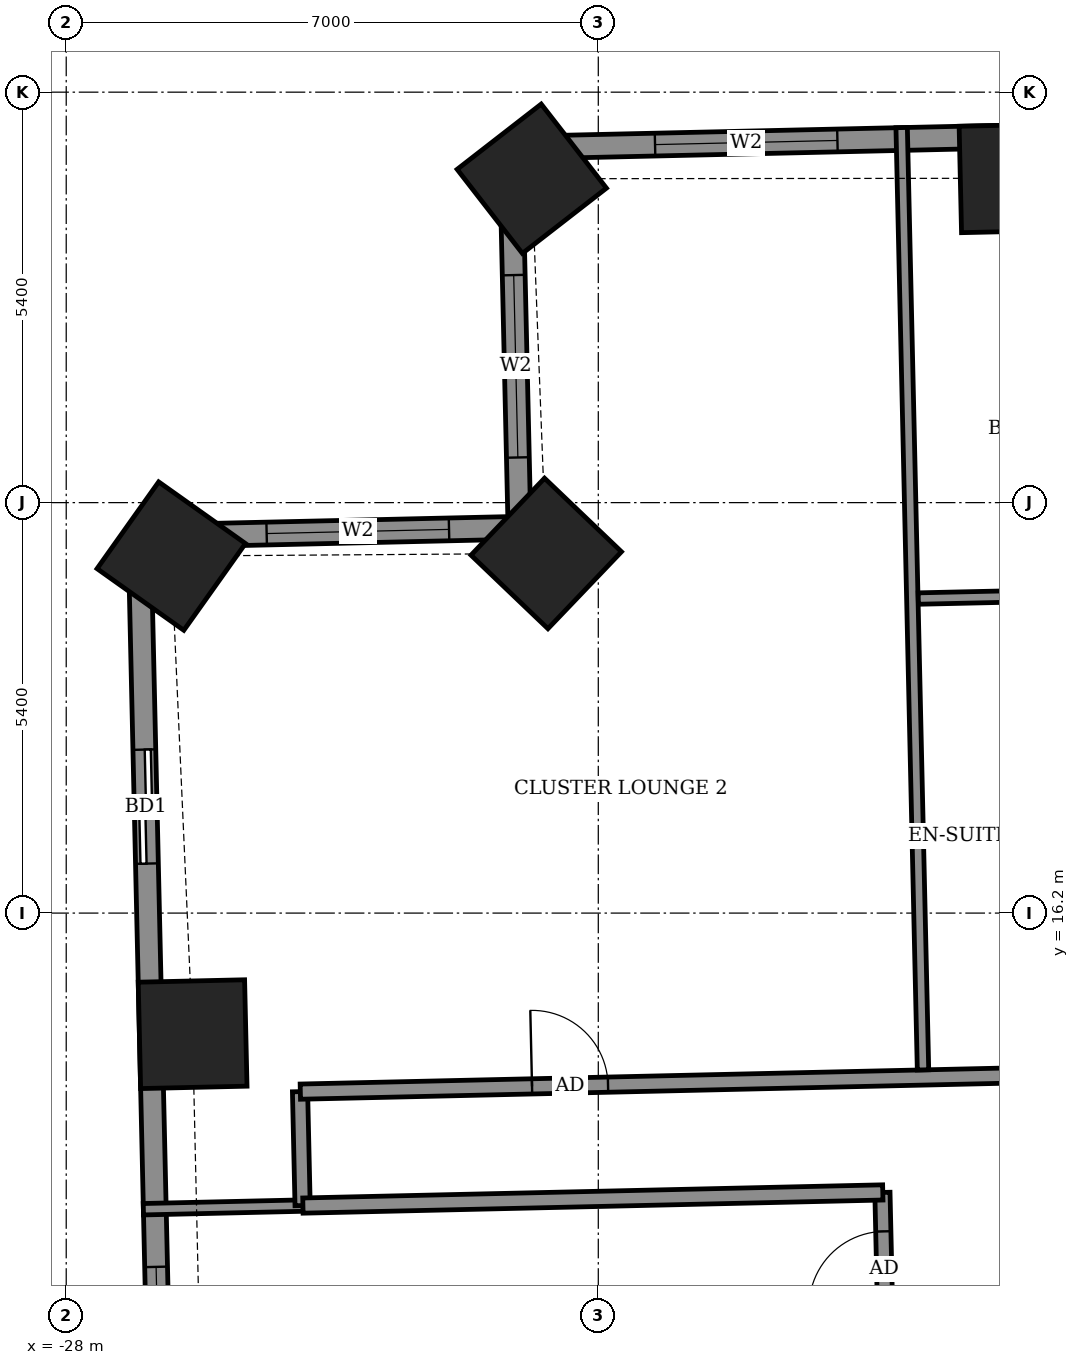
"""IFC4 building model, lengths in metres.
Left out: names, types, materials, properties, quantities, classifications, styles, units other than length and angle.
Written with IfcOpenShell. Run it as: python <this file> out.ifc"""

import sys

from ifc_helpers import new_model, si_unit, direction, frame, frame_2d, origin, origin_2d, place, context, subcontext, project, spatial, rectangle, extrude, element, fill, save


model = new_model("IFC4")
c1 = context("Model", 3, precision=1e-05, world=origin(), true_north=direction((0.0, 1.0)))
c2 = subcontext(c1, "Body", "Model", "MODEL_VIEW")
j1 = project(units=[si_unit("LENGTHUNIT", "METRE"), si_unit("PLANEANGLEUNIT", "RADIAN")], contexts=[c1])
p1 = place(None, origin())
s1 = spatial("IfcSite", under=j1, at=p1, CompositionType="ELEMENT")
p2 = place(p1, origin())
s2 = spatial("IfcBuilding", under=s1, at=p2, CompositionType="ELEMENT")
p3 = place(p2, frame((0.0, 0.0, 90.1)))
s3 = spatial("IfcBuildingStorey", under=s2, at=p3, CompositionType="ELEMENT", Elevation=90.1)
for number, where, z_axis, x_axis in (
    (1, (-15.537, 25.867, -0.55), (0.0, 0.0, 1.0), (-1.0, -0.023, 0.0)),
    (2, (-21.875, 25.861, -0.55), (0.0, 0.0, 1.0), (-0.79, -0.613, 0.0)),
    (3, (-21.685, 20.931, -0.55), (0.0, 0.0, 1.0), (-0.691, -0.723, 0.0)),
    (4, (-26.618, 20.897, -0.55), (0.0, 0.0, 1.0), (-0.579, -0.815, 0.0)),
    (5, (-26.337, 14.607, -0.55), (0.0, 0.0, 1.0), (0.023, -1.0, 0.0)),
):
    element("IfcColumn", number, at=place(p3, frame(where, z_axis=z_axis, x_axis=x_axis)), inside=s3, PredefinedType="COLUMN", context=c2, shape_type="SweptSolid", body=[
        extrude(rectangle(XDim=1.4, YDim=1.4, at=origin_2d()), origin(), (0.0, 0.0, 1.0), 3.6),
    ])
p4 = place(p3, frame((24.809, 27.333, 0.0), z_axis=(0.0, 0.0, 1.0), x_axis=(-0.999742489858, -0.022692597327, 0.0)))
e6 = element("IfcWall", 6, at=p4, inside=s3, PredefinedType="SOLIDWALL", context=c2, shape_type="SweptSolid", body=[
    extrude(rectangle(XDim=46.972, YDim=0.3, at=frame_2d((23.486, 0.0))), origin(), (0.0, 0.0, 1.0), 3.05),
])
p5 = place(p4, frame((1.311, 0.0, 0.0)))
e7 = element("IfcOpeningElement", 7, at=p5, cuts=e6, PredefinedType="OPENING", context=c2, shape_type="SweptSolid", body=[
    extrude(rectangle(XDim=1.2, YDim=2.4, at=frame_2d((0.6, 1.2))), frame((0.0, 0.16, 0.0), z_axis=(0.0, -1.0, 0.0), x_axis=(1.0, 0.0, 0.0)), (0.0, 0.0, 1.0), 0.32),
])
p6 = place(p4, frame((3.763, 0.0, 0.0)))
e8 = element("IfcOpeningElement", 8, at=p6, cuts=e6, PredefinedType="OPENING", context=c2, shape_type="SweptSolid", body=[
    extrude(rectangle(XDim=1.5, YDim=2.4, at=frame_2d((0.75, 1.2))), frame((0.0, 0.16, 0.0), z_axis=(0.0, -1.0, 0.0), x_axis=(1.0, 0.0, 0.0)), (0.0, 0.0, 1.0), 0.32),
])
p7 = place(p4, frame((8.647, 0.0, 0.0)))
e9 = element("IfcOpeningElement", 9, at=p7, cuts=e6, PredefinedType="OPENING", context=c2, shape_type="SweptSolid", body=[
    extrude(rectangle(XDim=1.5, YDim=2.4, at=frame_2d((0.75, 1.2))), frame((0.0, 0.16, 0.0), z_axis=(0.0, -1.0, 0.0), x_axis=(1.0, 0.0, 0.0)), (0.0, 0.0, 1.0), 0.32),
])
p8 = place(p4, frame((14.239, 0.0, 0.0)))
e10 = element("IfcOpeningElement", 10, at=p8, cuts=e6, PredefinedType="OPENING", context=c2, shape_type="SweptSolid", body=[
    extrude(rectangle(XDim=1.2, YDim=2.4, at=frame_2d((0.6, 1.2))), frame((0.0, 0.16, 0.0), z_axis=(0.0, -1.0, 0.0), x_axis=(1.0, 0.0, 0.0)), (0.0, 0.0, 1.0), 0.32),
])
p9 = place(p4, frame((17.016, 0.0, 0.0)))
e11 = element("IfcOpeningElement", 11, at=p9, cuts=e6, PredefinedType="OPENING", context=c2, shape_type="SweptSolid", body=[
    extrude(rectangle(XDim=1.5, YDim=2.4, at=frame_2d((0.75, 1.2))), frame((0.0, 0.16, 0.0), z_axis=(0.0, -1.0, 0.0), x_axis=(1.0, 0.0, 0.0)), (0.0, 0.0, 1.0), 0.32),
])
p10 = place(p4, frame((21.816, 0.0, 0.0)))
e12 = element("IfcOpeningElement", 12, at=p10, cuts=e6, PredefinedType="OPENING", context=c2, shape_type="SweptSolid", body=[
    extrude(rectangle(XDim=1.5, YDim=2.4, at=frame_2d((0.75, 1.2))), frame((0.0, 0.16, 0.0), z_axis=(0.0, -1.0, 0.0), x_axis=(1.0, 0.0, 0.0)), (0.0, 0.0, 1.0), 0.32),
])
p11 = place(p4, frame((24.817, 0.0, 0.0)))
e13 = element("IfcOpeningElement", 13, at=p11, cuts=e6, PredefinedType="OPENING", context=c2, shape_type="SweptSolid", body=[
    extrude(rectangle(XDim=1.2, YDim=2.4, at=frame_2d((0.6, 1.2))), frame((0.0, 0.16, 0.0), z_axis=(0.0, -1.0, 0.0), x_axis=(1.0, 0.0, 0.0)), (0.0, 0.0, 1.0), 0.32),
])
p12 = place(p4, frame((30.244, 0.0, 0.0)))
e14 = element("IfcOpeningElement", 14, at=p12, cuts=e6, PredefinedType="OPENING", context=c2, shape_type="SweptSolid", body=[
    extrude(rectangle(XDim=1.5, YDim=2.4, at=frame_2d((0.75, 1.2))), frame((0.0, 0.16, 0.0), z_axis=(0.0, -1.0, 0.0), x_axis=(1.0, 0.0, 0.0)), (0.0, 0.0, 1.0), 0.32),
])
p13 = place(p4, frame((35.069, 0.0, 0.0)))
e15 = element("IfcOpeningElement", 15, at=p13, cuts=e6, PredefinedType="OPENING", context=c2, shape_type="SweptSolid", body=[
    extrude(rectangle(XDim=1.5, YDim=2.4, at=frame_2d((0.75, 1.2))), frame((0.0, 0.16, 0.0), z_axis=(0.0, -1.0, 0.0), x_axis=(1.0, 0.0, 0.0)), (0.0, 0.0, 1.0), 0.32),
])
p14 = place(p4, frame((37.995, 0.0, 0.0)))
e16 = element("IfcOpeningElement", 16, at=p14, cuts=e6, PredefinedType="OPENING", context=c2, shape_type="SweptSolid", body=[
    extrude(rectangle(XDim=1.5, YDim=2.4, at=frame_2d((0.75, 1.2))), frame((0.0, 0.16, 0.0), z_axis=(0.0, -1.0, 0.0), x_axis=(1.0, 0.0, 0.0)), (0.0, 0.0, 1.0), 0.32),
])
p15 = place(p4, frame((42.674, 0.0, 0.9)))
e17 = element("IfcOpeningElement", 17, at=p15, cuts=e6, PredefinedType="OPENING", context=c2, shape_type="SweptSolid", body=[
    extrude(rectangle(XDim=2.4, YDim=1.5, at=frame_2d((1.2, 0.75))), frame((0.0, 0.16, 0.0), z_axis=(0.0, -1.0, 0.0), x_axis=(1.0, 0.0, 0.0)), (0.0, 0.0, 1.0), 0.32),
])
p16 = place(p3, frame((-22.151, 26.267, 0.0), z_axis=(0.0, 0.0, 1.0), x_axis=(0.022756903044, -0.999741028149, 0.0)))
e18 = element("IfcWall", 18, at=p16, inside=s3, PredefinedType="SOLIDWALL", context=c2, shape_type="SweptSolid", body=[
    extrude(rectangle(XDim=4.999, YDim=0.3, at=frame_2d((2.5, 0.0))), origin(), (0.0, 0.0, 1.0), 2.55),
])
p17 = place(p16, frame((1.674, 0.0, 0.9)))
e19 = element("IfcOpeningElement", 19, at=p17, cuts=e18, PredefinedType="OPENING", context=c2, shape_type="SweptSolid", body=[
    extrude(rectangle(XDim=2.4, YDim=1.5, at=frame_2d((1.2, 0.75))), frame((0.0, 0.16, 0.0), z_axis=(0.0, -1.0, 0.0), x_axis=(1.0, 0.0, 0.0)), (0.0, 0.0, 1.0), 0.32),
])
p18 = place(p3, frame((-22.037, 21.269, 0.0), z_axis=(0.0, 0.0, 1.0), x_axis=(-0.999739992103, -0.022802372469, 0.0)))
e20 = element("IfcWall", 20, at=p18, inside=s3, PredefinedType="SOLIDWALL", context=c2, shape_type="SweptSolid", body=[
    extrude(rectangle(XDim=5.0, YDim=0.3, at=frame_2d((2.5, 0.0))), origin(), (0.0, 0.0, 1.0), 2.55),
])
p19 = place(p18, frame((0.927, 0.0, 0.9)))
e21 = element("IfcOpeningElement", 21, at=p19, cuts=e20, PredefinedType="OPENING", context=c2, shape_type="SweptSolid", body=[
    extrude(rectangle(XDim=2.4, YDim=1.5, at=frame_2d((1.2, 0.75))), frame((0.0, 0.16, 0.0), z_axis=(0.0, -1.0, 0.0), x_axis=(1.0, 0.0, 0.0)), (0.0, 0.0, 1.0), 0.32),
])
p20 = place(p3, frame((-27.036, 21.155, 0.0), z_axis=(0.0, 0.0, 1.0), x_axis=(0.022730142562, -0.999741636934, 0.0)))
e22 = element("IfcWall", 22, at=p20, inside=s3, PredefinedType="SOLIDWALL", context=c2, shape_type="SweptSolid", body=[
    extrude(rectangle(XDim=13.329, YDim=0.3, at=frame_2d((6.665, 0.0))), origin(), (0.0, 0.0, 1.0), 3.05),
])
p21 = place(p20, frame((2.805, 0.0, 0.0)))
e23 = element("IfcOpeningElement", 23, at=p21, cuts=e22, PredefinedType="OPENING", context=c2, shape_type="SweptSolid", body=[
    extrude(rectangle(XDim=1.5, YDim=2.4, at=frame_2d((0.75, 1.2))), frame((0.0, 0.16, 0.0), z_axis=(0.0, -1.0, 0.0), x_axis=(1.0, 0.0, 0.0)), (0.0, 0.0, 1.0), 0.32),
])
p22 = place(p20, frame((9.612, 0.0, 0.9)))
e24 = element("IfcOpeningElement", 24, at=p22, cuts=e22, PredefinedType="OPENING", context=c2, shape_type="SweptSolid", body=[
    extrude(rectangle(XDim=2.4, YDim=1.5, at=frame_2d((1.2, 0.75))), frame((0.0, 0.16, 0.0), z_axis=(0.0, -1.0, 0.0), x_axis=(1.0, 0.0, 0.0)), (0.0, 0.0, 1.0), 0.32),
])
p23 = place(p3, frame((-16.684, -12.919, 0.0), z_axis=(0.0, 0.0, 1.0), x_axis=(-0.022706151961, 0.999742182097, 0.0)))
e25 = element("IfcWall", 25, at=p23, inside=s3, PredefinedType="PARTITIONING", context=c2, shape_type="SweptSolid", body=[
    extrude(rectangle(XDim=25.45, YDim=0.2, at=frame_2d((12.725, 0.0))), origin(), (0.0, 0.0, 1.0), 3.05),
])
p24 = place(p23, frame((23.938, 0.0, 0.0)))
e26 = element("IfcOpeningElement", 26, at=p24, cuts=e25, PredefinedType="OPENING", context=c2, shape_type="SweptSolid", body=[
    extrude(rectangle(XDim=1.0, YDim=2.1, at=frame_2d((0.5, 1.05))), frame((0.0, 0.11, 0.0), z_axis=(0.0, -1.0, 0.0), x_axis=(1.0, 0.0, 0.0)), (0.0, 0.0, 1.0), 0.22),
])
p25 = place(p23, frame((21.775, 0.0, 0.0)))
e27 = element("IfcOpeningElement", 27, at=p25, cuts=e25, PredefinedType="OPENING", context=c2, shape_type="SweptSolid", body=[
    extrude(rectangle(XDim=0.9, YDim=2.1, at=frame_2d((0.45, 1.05))), frame((0.0, 0.11, 0.0), z_axis=(0.0, -1.0, 0.0), x_axis=(1.0, 0.0, 0.0)), (0.0, 0.0, 1.0), 0.22),
])
p26 = place(p23, frame((16.975, 0.0, 0.0)))
e28 = element("IfcOpeningElement", 28, at=p26, cuts=e25, PredefinedType="OPENING", context=c2, shape_type="SweptSolid", body=[
    extrude(rectangle(XDim=1.0, YDim=2.1, at=frame_2d((0.5, 1.05))), frame((0.0, 0.11, 0.0), z_axis=(0.0, -1.0, 0.0), x_axis=(1.0, 0.0, 0.0)), (0.0, 0.0, 1.0), 0.22),
])
p27 = place(p23, frame((19.275, 0.0, 0.0)))
e29 = element("IfcOpeningElement", 29, at=p27, cuts=e25, PredefinedType="OPENING", context=c2, shape_type="SweptSolid", body=[
    extrude(rectangle(XDim=0.9, YDim=2.1, at=frame_2d((0.45, 1.05))), frame((0.0, 0.11, 0.0), z_axis=(0.0, -1.0, 0.0), x_axis=(1.0, 0.0, 0.0)), (0.0, 0.0, 1.0), 0.22),
])
p28 = place(p23, frame((15.075, 0.0, 0.0)))
e30 = element("IfcOpeningElement", 30, at=p28, cuts=e25, PredefinedType="OPENING", context=c2, shape_type="SweptSolid", body=[
    extrude(rectangle(XDim=1.0, YDim=2.1, at=frame_2d((0.5, 1.05))), frame((0.0, 0.11, 0.0), z_axis=(0.0, -1.0, 0.0), x_axis=(1.0, 0.0, 0.0)), (0.0, 0.0, 1.0), 0.22),
])
p29 = place(p23, frame((12.975, 0.0, 0.0)))
e31 = element("IfcOpeningElement", 31, at=p29, cuts=e25, PredefinedType="OPENING", context=c2, shape_type="SweptSolid", body=[
    extrude(rectangle(XDim=0.9, YDim=2.1, at=frame_2d((0.45, 1.05))), frame((0.0, 0.11, 0.0), z_axis=(0.0, -1.0, 0.0), x_axis=(1.0, 0.0, 0.0)), (0.0, 0.0, 1.0), 0.22),
])
p30 = place(p23, frame((10.55, 0.0, 0.0)))
e32 = element("IfcOpeningElement", 32, at=p30, cuts=e25, PredefinedType="OPENING", context=c2, shape_type="SweptSolid", body=[
    extrude(rectangle(XDim=1.0, YDim=2.1, at=frame_2d((0.5, 1.05))), frame((0.0, 0.11, 0.0), z_axis=(0.0, -1.0, 0.0), x_axis=(1.0, 0.0, 0.0)), (0.0, 0.0, 1.0), 0.22),
])
p31 = place(p23, frame((8.125, 0.0, 0.0)))
e33 = element("IfcOpeningElement", 33, at=p31, cuts=e25, PredefinedType="OPENING", context=c2, shape_type="SweptSolid", body=[
    extrude(rectangle(XDim=0.9, YDim=2.1, at=frame_2d((0.45, 1.05))), frame((0.0, 0.11, 0.0), z_axis=(0.0, -1.0, 0.0), x_axis=(1.0, 0.0, 0.0)), (0.0, 0.0, 1.0), 0.22),
])
p32 = place(p23, frame((1.737, 0.0, 0.0)))
e34 = element("IfcOpeningElement", 34, at=p32, cuts=e25, PredefinedType="OPENING", context=c2, shape_type="SweptSolid", body=[
    extrude(rectangle(XDim=1.0, YDim=2.1, at=frame_2d((0.5, 1.05))), frame((0.0, 0.11, 0.0), z_axis=(0.0, -1.0, 0.0), x_axis=(1.0, 0.0, 0.0)), (0.0, 0.0, 1.0), 0.22),
])
p33 = place(p23, frame((5.425, 0.0, 0.0)))
e35 = element("IfcOpeningElement", 35, at=p33, cuts=e25, PredefinedType="OPENING", context=c2, shape_type="SweptSolid", body=[
    extrude(rectangle(XDim=0.9, YDim=2.1, at=frame_2d((0.45, 1.05))), frame((0.0, 0.11, 0.0), z_axis=(0.0, -1.0, 0.0), x_axis=(1.0, 0.0, 0.0)), (0.0, 0.0, 1.0), 0.22),
])
p34 = place(p3, frame((-26.985, 12.304, 0.0), z_axis=(0.0, 0.0, 1.0), x_axis=(0.999738589876, 0.02286376854, 0.0)))
e36 = element("IfcWall", 36, at=p34, inside=s3, PredefinedType="PARTITIONING", context=c2, shape_type="SweptSolid", body=[
    extrude(rectangle(XDim=2.104, YDim=0.15, at=frame_2d((1.052, 0.0))), origin(), (0.0, 0.0, 1.0), 2.55),
])
p35 = place(p3, frame((-24.89, 12.352, 0.0), z_axis=(0.0, 0.0, 1.0), x_axis=(-0.02279537805, 0.999740151609, 0.0)))
e37 = element("IfcWall", 37, at=p35, inside=s3, PredefinedType="PARTITIONING", context=c2, shape_type="SweptSolid", body=[
    extrude(rectangle(XDim=1.5, YDim=0.2, at=frame_2d((0.75, 0.0))), origin(), (0.0, 0.0, 1.0), 3.05),
])
p36 = place(p3, frame((-24.886, 12.352, 0.0), z_axis=(0.0, 0.0, 1.0), x_axis=(0.999743418763, 0.0226516366, 0.0)))
e38 = element("IfcWall", 38, at=p36, inside=s3, PredefinedType="PARTITIONING", context=c2, shape_type="SweptSolid", body=[
    extrude(rectangle(XDim=7.631, YDim=0.2, at=frame_2d((3.815, 0.0))), origin(), (0.0, 0.0, 1.0), 3.05),
])
p37 = place(p3, frame((-24.92, 13.851, 0.0), z_axis=(0.0, 0.0, 1.0), x_axis=(0.999742411711, 0.022696039895, 0.0)))
e39 = element("IfcWall", 39, at=p37, inside=s3, PredefinedType="PARTITIONING", context=c2, shape_type="SweptSolid", body=[
    extrude(rectangle(XDim=52.472, YDim=0.2, at=frame_2d((26.236, 0.0))), origin(), (0.0, 0.0, 1.0), 3.05),
])
p38 = place(p37, frame((50.088, 0.0, 0.0)))
e40 = element("IfcOpeningElement", 40, at=p38, cuts=e39, PredefinedType="OPENING", context=c2, shape_type="SweptSolid", body=[
    extrude(rectangle(XDim=1.0, YDim=2.1, at=frame_2d((0.5, 1.05))), frame((0.0, 0.11, 0.0), z_axis=(0.0, -1.0, 0.0), x_axis=(1.0, 0.0, 0.0)), (0.0, 0.0, 1.0), 0.22),
])
p39 = place(p37, frame((45.725, 0.0, 0.0)))
e41 = element("IfcOpeningElement", 41, at=p39, cuts=e39, PredefinedType="OPENING", context=c2, shape_type="SweptSolid", body=[
    extrude(rectangle(XDim=0.9, YDim=2.1, at=frame_2d((0.45, 1.05))), frame((0.0, 0.11, 0.0), z_axis=(0.0, -1.0, 0.0), x_axis=(1.0, 0.0, 0.0)), (0.0, 0.0, 1.0), 0.22),
])
p40 = place(p37, frame((38.975, 0.0, 0.0)))
e42 = element("IfcOpeningElement", 42, at=p40, cuts=e39, PredefinedType="OPENING", context=c2, shape_type="SweptSolid", body=[
    extrude(rectangle(XDim=0.9, YDim=2.1, at=frame_2d((0.45, 1.05))), frame((0.0, 0.11, 0.0), z_axis=(0.0, -1.0, 0.0), x_axis=(1.0, 0.0, 0.0)), (0.0, 0.0, 1.0), 0.22),
])
p41 = place(p37, frame((37.05, 0.0, 0.0)))
e43 = element("IfcOpeningElement", 43, at=p41, cuts=e39, PredefinedType="OPENING", context=c2, shape_type="SweptSolid", body=[
    extrude(rectangle(XDim=0.9, YDim=2.1, at=frame_2d((0.45, 1.05))), frame((0.0, 0.11, 0.0), z_axis=(0.0, -1.0, 0.0), x_axis=(1.0, 0.0, 0.0)), (0.0, 0.0, 1.0), 0.22),
])
p42 = place(p37, frame((30.35, 0.0, 0.0)))
e44 = element("IfcOpeningElement", 44, at=p42, cuts=e39, PredefinedType="OPENING", context=c2, shape_type="SweptSolid", body=[
    extrude(rectangle(XDim=0.9, YDim=2.1, at=frame_2d((0.45, 1.05))), frame((0.0, 0.11, 0.0), z_axis=(0.0, -1.0, 0.0), x_axis=(1.0, 0.0, 0.0)), (0.0, 0.0, 1.0), 0.22),
])
p43 = place(p37, frame((28.4, 0.0, 0.0)))
e45 = element("IfcOpeningElement", 45, at=p43, cuts=e39, PredefinedType="OPENING", context=c2, shape_type="SweptSolid", body=[
    extrude(rectangle(XDim=0.9, YDim=2.1, at=frame_2d((0.45, 1.05))), frame((0.0, 0.11, 0.0), z_axis=(0.0, -1.0, 0.0), x_axis=(1.0, 0.0, 0.0)), (0.0, 0.0, 1.0), 0.22),
])
p44 = place(p37, frame((21.675, 0.0, 0.0)))
e46 = element("IfcOpeningElement", 46, at=p44, cuts=e39, PredefinedType="OPENING", context=c2, shape_type="SweptSolid", body=[
    extrude(rectangle(XDim=0.9, YDim=2.1, at=frame_2d((0.45, 1.05))), frame((0.0, 0.11, 0.0), z_axis=(0.0, -1.0, 0.0), x_axis=(1.0, 0.0, 0.0)), (0.0, 0.0, 1.0), 0.22),
])
p45 = place(p37, frame((19.775, 0.0, 0.0)))
e47 = element("IfcOpeningElement", 47, at=p45, cuts=e39, PredefinedType="OPENING", context=c2, shape_type="SweptSolid", body=[
    extrude(rectangle(XDim=0.9, YDim=2.1, at=frame_2d((0.45, 1.05))), frame((0.0, 0.11, 0.0), z_axis=(0.0, -1.0, 0.0), x_axis=(1.0, 0.0, 0.0)), (0.0, 0.0, 1.0), 0.22),
])
p46 = place(p37, frame((13.0, 0.0, 0.0)))
e48 = element("IfcOpeningElement", 48, at=p46, cuts=e39, PredefinedType="OPENING", context=c2, shape_type="SweptSolid", body=[
    extrude(rectangle(XDim=0.9, YDim=2.1, at=frame_2d((0.45, 1.05))), frame((0.0, 0.11, 0.0), z_axis=(0.0, -1.0, 0.0), x_axis=(1.0, 0.0, 0.0)), (0.0, 0.0, 1.0), 0.22),
])
p47 = place(p37, frame((11.075, 0.0, 0.0)))
e49 = element("IfcOpeningElement", 49, at=p47, cuts=e39, PredefinedType="OPENING", context=c2, shape_type="SweptSolid", body=[
    extrude(rectangle(XDim=0.9, YDim=2.1, at=frame_2d((0.45, 1.05))), frame((0.0, 0.11, 0.0), z_axis=(0.0, -1.0, 0.0), x_axis=(1.0, 0.0, 0.0)), (0.0, 0.0, 1.0), 0.22),
])
p48 = place(p37, frame((3.049, 0.0, 0.0)))
e50 = element("IfcOpeningElement", 50, at=p48, cuts=e39, PredefinedType="OPENING", context=c2, shape_type="SweptSolid", body=[
    extrude(rectangle(XDim=1.0, YDim=2.1, at=frame_2d((0.5, 1.05))), frame((0.0, 0.11, 0.0), z_axis=(0.0, -1.0, 0.0), x_axis=(1.0, 0.0, 0.0)), (0.0, 0.0, 1.0), 0.22),
])
p49 = place(p3, frame((-16.728, 14.137, 0.0), z_axis=(0.0, 0.0, 1.0), x_axis=(-0.022661475803, 0.999743195783, 0.0)))
e51 = element("IfcWall", 51, at=p49, inside=s3, PredefinedType="PARTITIONING", context=c2, shape_type="SweptSolid", body=[
    extrude(rectangle(XDim=12.4, YDim=0.15, at=frame_2d((6.2, 0.0))), origin(), (0.0, 0.0, 1.0), 2.55),
])
p50 = place(p3, frame((-16.79, 20.338, 0.0), z_axis=(0.0, 0.0, 1.0), x_axis=(0.999749954681, 0.022361308448, 0.0)))
e52 = element("IfcWall", 52, at=p50, inside=s3, PredefinedType="PARTITIONING", context=c2, shape_type="SweptSolid", body=[
    extrude(rectangle(XDim=2.325, YDim=0.15, at=frame_2d((1.163, 0.0))), origin(), (0.0, 0.0, 1.0), 3.05),
])
p51 = place(p15, origin())
e53 = element("IfcWindow", 53, at=p51, inside=s3, PartitioningType="DOUBLE_PANEL_VERTICAL", PredefinedType="WINDOW", context=c2, shape_type="SweptSolid", body=[
    extrude(rectangle(XDim=2.4, YDim=1.5, at=frame_2d((1.2, 0.75))), frame((0.0, 0.03, 0.0), z_axis=(0.0, -1.0, 0.0), x_axis=(1.0, 0.0, 0.0)), (0.0, 0.0, 1.0), 0.06),
])
fill(e17, e53)
p52 = place(p17, origin())
e54 = element("IfcWindow", 54, at=p52, inside=s3, PartitioningType="DOUBLE_PANEL_VERTICAL", PredefinedType="WINDOW", context=c2, shape_type="SweptSolid", body=[
    extrude(rectangle(XDim=2.4, YDim=1.5, at=frame_2d((1.2, 0.75))), frame((0.0, 0.03, 0.0), z_axis=(0.0, -1.0, 0.0), x_axis=(1.0, 0.0, 0.0)), (0.0, 0.0, 1.0), 0.06),
])
fill(e19, e54)
p53 = place(p19, origin())
e55 = element("IfcWindow", 55, at=p53, inside=s3, PartitioningType="DOUBLE_PANEL_VERTICAL", PredefinedType="WINDOW", context=c2, shape_type="SweptSolid", body=[
    extrude(rectangle(XDim=2.4, YDim=1.5, at=frame_2d((1.2, 0.75))), frame((0.0, 0.03, 0.0), z_axis=(0.0, -1.0, 0.0), x_axis=(1.0, 0.0, 0.0)), (0.0, 0.0, 1.0), 0.06),
])
fill(e21, e55)
p54 = place(p21, origin())
e56 = element("IfcDoor", 56, at=p54, inside=s3, OperationType="SLIDING_TO_LEFT", PredefinedType="DOOR", context=c2, shape_type="SweptSolid", body=[
    extrude(rectangle(XDim=1.5, YDim=2.4, at=frame_2d((0.75, 1.2))), frame((0.0, 0.025, 0.0), z_axis=(0.0, -1.0, 0.0), x_axis=(1.0, 0.0, 0.0)), (0.0, 0.0, 1.0), 0.05),
])
fill(e23, e56)
p55 = place(p22, origin())
e57 = element("IfcWindow", 57, at=p55, inside=s3, PartitioningType="DOUBLE_PANEL_VERTICAL", PredefinedType="WINDOW", context=c2, shape_type="SweptSolid", body=[
    extrude(rectangle(XDim=2.4, YDim=1.5, at=frame_2d((1.2, 0.75))), frame((0.0, 0.03, 0.0), z_axis=(0.0, -1.0, 0.0), x_axis=(1.0, 0.0, 0.0)), (0.0, 0.0, 1.0), 0.06),
])
fill(e24, e57)
p56 = place(p48, origin())
e58 = element("IfcDoor", 58, at=p56, inside=s3, OperationType="SINGLE_SWING_RIGHT", PredefinedType="DOOR", context=c2, shape_type="SweptSolid", body=[
    extrude(rectangle(XDim=1.0, YDim=2.1, at=frame_2d((0.5, 1.05))), frame((0.0, 0.025, 0.0), z_axis=(0.0, -1.0, 0.0), x_axis=(1.0, 0.0, 0.0)), (0.0, 0.0, 1.0), 0.05),
])
fill(e50, e58)
p57 = place(p24, origin())
e59 = element("IfcDoor", 59, at=p57, inside=s3, OperationType="SINGLE_SWING_LEFT", PredefinedType="DOOR", context=c2, shape_type="SweptSolid", body=[
    extrude(rectangle(XDim=1.0, YDim=2.1, at=frame_2d((0.5, 1.05))), frame((0.0, 0.025, 0.0), z_axis=(0.0, -1.0, 0.0), x_axis=(1.0, 0.0, 0.0)), (0.0, 0.0, 1.0), 0.05),
])
fill(e26, e59)
save(model, sys.argv[1])
